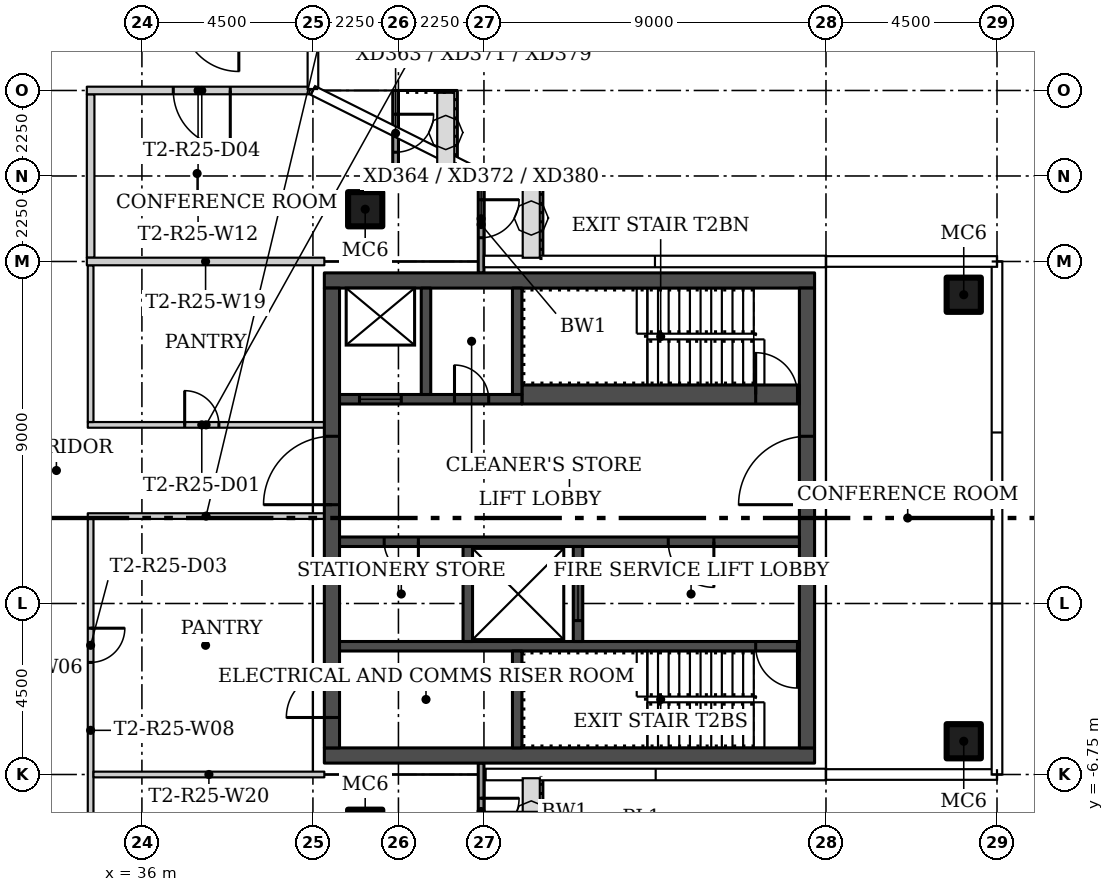
"""IFC4 building model, lengths in metres.
Left out: names, types, materials, properties, quantities, classifications, styles, units other than length and angle.
Written with IfcOpenShell. Run it as: python <this file> out.ifc"""

import sys

from ifc_helpers import new_model, si_unit, direction, frame, frame_2d, origin, origin_2d, place, context, subcontext, project, spatial, rectangle, hollow_rectangle, extrude, element, fill, save


model = new_model("IFC4")
c1 = context("Model", 3, precision=1e-05, world=origin(), true_north=direction((0.0, 1.0)))
c2 = subcontext(c1, "Body", "Model", "MODEL_VIEW")
j1 = project(units=[si_unit("LENGTHUNIT", "METRE"), si_unit("PLANEANGLEUNIT", "RADIAN")], contexts=[c1])
p1 = place(None, origin())
s1 = spatial("IfcSite", under=j1, at=p1, CompositionType="ELEMENT")
p2 = place(p1, origin())
s2 = spatial("IfcBuilding", under=s1, at=p2, CompositionType="ELEMENT")
p3 = place(p2, frame((0.0, 0.0, 230.4)))
s3 = spatial("IfcBuildingStorey", under=s2, at=p3, CompositionType="ELEMENT", Elevation=230.4)
for number, where in (
    (1, (41.875, 8.125, 0.0)),
    (2, (41.875, -8.125, 0.0)),
    (3, (57.625, -5.875, 0.0)),
    (4, (57.625, 5.875, 0.0)),
):
    element("IfcColumn", number, at=place(p3, frame(where)), inside=s3, PredefinedType="COLUMN", context=c2, shape_type="SweptSolid", body=[
        extrude(hollow_rectangle(XDim=0.9, YDim=0.9, WallThickness=0.036, at=origin_2d()), origin(), (0.0, 0.0, 1.0), 3.55),
    ])
p4 = place(p3, frame((40.8, 0.05, 0.0), z_axis=(0.0, 0.0, 1.0), x_axis=(-1.0, 0.0, 0.0)))
e5 = element("IfcWall", 5, at=p4, inside=s3, PredefinedType="PARTITIONING", context=c2, shape_type="SweptSolid", body=[
    extrude(rectangle(XDim=6.225, YDim=0.15, at=frame_2d((3.112, 0.0))), origin(), (0.0, 0.0, 1.0), 3.55),
])
p5 = place(p3, frame((34.575, 2.45, 0.0)))
e6 = element("IfcWall", 6, at=p5, inside=s3, PredefinedType="PARTITIONING", context=c2, shape_type="SweptSolid", body=[
    extrude(rectangle(XDim=6.225, YDim=0.15, at=frame_2d((3.112, 0.0))), origin(), (0.0, 0.0, 1.0), 3.55),
])
p6 = place(p5, frame((2.55, 0.0, 0.0)))
e7 = element("IfcOpeningElement", 7, at=p6, cuts=e6, PredefinedType="OPENING", context=c2, shape_type="SweptSolid", body=[
    extrude(rectangle(XDim=0.9, YDim=2.1, at=frame_2d((0.45, 1.05))), frame((0.0, 0.085, 0.0), z_axis=(0.0, -1.0, 0.0), x_axis=(1.0, 0.0, 0.0)), (0.0, 0.0, 1.0), 0.17),
])
p7 = place(p3, frame((34.65, -0.025, 0.0), z_axis=(0.0, 0.0, 1.0), x_axis=(0.0, -1.0, 0.0)))
e8 = element("IfcWall", 8, at=p7, inside=s3, PredefinedType="PARTITIONING", context=c2, shape_type="SweptSolid", body=[
    extrude(rectangle(XDim=11.125, YDim=0.15, at=frame_2d((5.562, 0.0))), origin(), (0.0, 0.0, 1.0), 3.55),
])
p8 = place(p7, frame((8.475, 0.0, 0.0)))
e9 = element("IfcOpeningElement", 9, at=p8, cuts=e8, PredefinedType="OPENING", context=c2, shape_type="SweptSolid", body=[
    extrude(rectangle(XDim=1.0, YDim=2.4, at=frame_2d((0.5, 1.2))), frame((0.0, 0.085, 0.0), z_axis=(0.0, -1.0, 0.0), x_axis=(1.0, 0.0, 0.0)), (0.0, 0.0, 1.0), 0.17),
])
p9 = place(p7, frame((2.875, 0.0, 0.0)))
e10 = element("IfcOpeningElement", 10, at=p9, cuts=e8, PredefinedType="OPENING", context=c2, shape_type="SweptSolid", body=[
    extrude(rectangle(XDim=0.9, YDim=2.1, at=frame_2d((0.45, 1.05))), frame((0.0, 0.085, 0.0), z_axis=(0.0, -1.0, 0.0), x_axis=(1.0, 0.0, 0.0)), (0.0, 0.0, 1.0), 0.17),
])
p10 = place(p3, frame((34.65, 6.65, 0.0), z_axis=(0.0, 0.0, 1.0), x_axis=(0.0, -1.0, 0.0)))
e11 = element("IfcWall", 11, at=p10, inside=s3, PredefinedType="PARTITIONING", context=c2, shape_type="SweptSolid", body=[
    extrude(rectangle(XDim=4.125, YDim=0.15, at=frame_2d((2.062, 0.0))), origin(), (0.0, 0.0, 1.0), 3.55),
])
p11 = place(p3, frame((34.65, 11.15, 0.0), z_axis=(0.0, 0.0, 1.0), x_axis=(0.0, -1.0, 0.0)))
e12 = element("IfcWall", 12, at=p11, inside=s3, PredefinedType="PARTITIONING", context=c2, shape_type="SweptSolid", body=[
    extrude(rectangle(XDim=4.3, YDim=0.2, at=frame_2d((2.15, 0.0))), origin(), (0.0, 0.0, 1.0), 3.55),
])
p12 = place(p3, frame((40.405, 11.25, 0.0), z_axis=(0.0, 0.0, 1.0), x_axis=(-1.0, 0.0, 0.0)))
e13 = element("IfcWall", 13, at=p12, inside=s3, PredefinedType="PARTITIONING", context=c2, shape_type="SweptSolid", body=[
    extrude(rectangle(XDim=5.855, YDim=0.2, at=frame_2d((2.927, 0.0))), origin(), (0.0, 0.0, 1.0), 3.55),
])
p13 = place(p12, frame((2.08, 0.0, 0.0)))
e14 = element("IfcOpeningElement", 14, at=p13, cuts=e13, PredefinedType="OPENING", context=c2, shape_type="SweptSolid", body=[
    extrude(rectangle(XDim=1.5, YDim=2.4, at=frame_2d((0.75, 1.2))), frame((0.0, 0.11, 0.0), z_axis=(0.0, -1.0, 0.0), x_axis=(1.0, 0.0, 0.0)), (0.0, 0.0, 1.0), 0.22),
])
p14 = place(p3, frame((40.8, 6.75, 0.0), z_axis=(0.0, 0.0, 1.0), x_axis=(-1.0, 0.0, 0.0)))
e15 = element("IfcWall", 15, at=p14, inside=s3, PredefinedType="PARTITIONING", context=c2, shape_type="SweptSolid", body=[
    extrude(rectangle(XDim=6.25, YDim=0.2, at=frame_2d((3.125, 0.0))), origin(), (0.0, 0.0, 1.0), 3.55),
])
p15 = place(p3, frame((34.725, -6.75, 0.0)))
e16 = element("IfcWall", 16, at=p15, inside=s3, PredefinedType="PARTITIONING", context=c2, shape_type="SweptSolid", body=[
    extrude(rectangle(XDim=6.075, YDim=0.15, at=frame_2d((3.037, 0.0))), origin(), (0.0, 0.0, 1.0), 3.55),
])
p16 = place(p3, frame((42.675, 11.25, 0.0), z_axis=(0.0, 0.0, 1.0), x_axis=(0.0, -1.0, 0.0)))
e17 = element("IfcWall", 17, at=p16, inside=s3, PredefinedType="SOLIDWALL", context=c2, shape_type="SweptSolid", body=[
    extrude(rectangle(XDim=2.25, YDim=0.15, at=frame_2d((1.125, 0.0))), origin(), (0.0, 0.0, 1.0), 3.45),
])
p17 = place(p16, frame((0.625, 0.0, 0.0)))
e18 = element("IfcOpeningElement", 18, at=p17, cuts=e17, PredefinedType="OPENING", context=c2, shape_type="SweptSolid", body=[
    extrude(rectangle(XDim=1.0, YDim=2.4, at=frame_2d((0.5, 1.2))), frame((0.0, 0.085, 0.0), z_axis=(0.0, -1.0, 0.0), x_axis=(1.0, 0.0, 0.0)), (0.0, 0.0, 1.0), 0.17),
])
p18 = place(p3, frame((44.925, 9.0, 0.0), z_axis=(0.0, 0.0, 1.0), x_axis=(0.0, -1.0, 0.0)))
e19 = element("IfcWall", 19, at=p18, inside=s3, PredefinedType="SOLIDWALL", context=c2, shape_type="SweptSolid", body=[
    extrude(rectangle(XDim=2.557, YDim=0.15, at=frame_2d((1.278, 0.0))), origin(), (0.0, 0.0, 1.0), 3.45),
])
p19 = place(p18, frame((0.625, 0.0, 0.0)))
e20 = element("IfcOpeningElement", 20, at=p19, cuts=e19, PredefinedType="OPENING", context=c2, shape_type="SweptSolid", body=[
    extrude(rectangle(XDim=1.0, YDim=2.4, at=frame_2d((0.5, 1.2))), frame((0.0, 0.085, 0.0), z_axis=(0.0, -1.0, 0.0), x_axis=(1.0, 0.0, 0.0)), (0.0, 0.0, 1.0), 0.17),
])
p20 = place(p3, frame((44.925, -6.448, 0.0), z_axis=(0.0, 0.0, 1.0), x_axis=(0.0, -1.0, 0.0)))
e21 = element("IfcWall", 21, at=p20, inside=s3, PredefinedType="SOLIDWALL", context=c2, shape_type="SweptSolid", body=[
    extrude(rectangle(XDim=2.552, YDim=0.15, at=frame_2d((1.276, 0.0))), origin(), (0.0, 0.0, 1.0), 3.45),
])
p21 = place(p20, frame((0.927, 0.0, 0.0)))
e22 = element("IfcOpeningElement", 22, at=p21, cuts=e21, PredefinedType="OPENING", context=c2, shape_type="SweptSolid", body=[
    extrude(rectangle(XDim=1.0, YDim=2.4, at=frame_2d((0.5, 1.2))), frame((0.0, 0.085, 0.0), z_axis=(0.0, -1.0, 0.0), x_axis=(1.0, 0.0, 0.0)), (0.0, 0.0, 1.0), 0.17),
])
for number, where, z_axis, x_axis in (
    (23, (53.7, -6.25, 0.0), (0.0, 0.0, 1.0), (-1.0, 0.0, 0.0)),
    (24, (53.7, 6.25, 0.0), (0.0, 0.0, 1.0), (-1.0, 0.0, 0.0)),
):
    element("IfcWall", number, at=place(p3, frame(where, z_axis=z_axis, x_axis=x_axis)), inside=s3, PredefinedType="SHEAR", context=c2, shape_type="SweptSolid", body=[
        extrude(rectangle(XDim=12.9, YDim=0.4, at=frame_2d((6.45, 0.0))), origin(), (0.0, 0.0, 1.0), 3.55),
    ])
p22 = place(p3, frame((53.5, -6.05, 0.0), z_axis=(0.0, 0.0, 1.0), x_axis=(0.0, 1.0, 0.0)))
e25 = element("IfcWall", 25, at=p22, inside=s3, PredefinedType="SHEAR", context=c2, shape_type="SweptSolid", body=[
    extrude(rectangle(XDim=12.1, YDim=0.4, at=frame_2d((6.05, 0.0))), origin(), (0.0, 0.0, 1.0), 3.55),
])
p23 = place(p22, frame((6.4, 0.0, 0.0)))
e26 = element("IfcOpeningElement", 26, at=p23, cuts=e25, PredefinedType="OPENING", context=c2, shape_type="SweptSolid", body=[
    extrude(rectangle(XDim=1.8, YDim=2.4, at=frame_2d((0.9, 1.2))), frame((0.0, 0.21, 0.0), z_axis=(0.0, -1.0, 0.0), x_axis=(1.0, 0.0, 0.0)), (0.0, 0.0, 1.0), 0.42),
])
p24 = place(p3, frame((41.0, -6.05, 0.0), z_axis=(0.0, 0.0, 1.0), x_axis=(0.0, 1.0, 0.0)))
e27 = element("IfcWall", 27, at=p24, inside=s3, PredefinedType="SHEAR", context=c2, shape_type="SweptSolid", body=[
    extrude(rectangle(XDim=12.1, YDim=0.4, at=frame_2d((6.05, 0.0))), origin(), (0.0, 0.0, 1.0), 3.55),
])
p25 = place(p24, frame((0.8, 0.0, 0.0)))
e28 = element("IfcOpeningElement", 28, at=p25, cuts=e27, PredefinedType="OPENING", context=c2, shape_type="SweptSolid", body=[
    extrude(rectangle(XDim=1.2, YDim=2.1, at=frame_2d((0.6, 1.05))), frame((0.0, 0.21, 0.0), z_axis=(0.0, -1.0, 0.0), x_axis=(1.0, 0.0, 0.0)), (0.0, 0.0, 1.0), 0.42),
])
p26 = place(p24, frame((6.4, 0.0, 0.0)))
e29 = element("IfcOpeningElement", 29, at=p26, cuts=e27, PredefinedType="OPENING", context=c2, shape_type="SweptSolid", body=[
    extrude(rectangle(XDim=1.8, YDim=2.4, at=frame_2d((0.9, 1.2))), frame((0.0, 0.21, 0.0), z_axis=(0.0, -1.0, 0.0), x_axis=(1.0, 0.0, 0.0)), (0.0, 0.0, 1.0), 0.42),
])
p27 = place(p3, frame((53.3, -3.375, 0.0), z_axis=(0.0, 0.0, 1.0), x_axis=(-1.0, 0.0, 0.0)))
e30 = element("IfcWall", 30, at=p27, inside=s3, PredefinedType="SHEAR", context=c2, shape_type="SweptSolid", body=[
    extrude(rectangle(XDim=12.1, YDim=0.25, at=frame_2d((6.05, 0.0))), origin(), (0.0, 0.0, 1.0), 3.55),
])
p28 = place(p27, frame((0.05, 0.0, 0.0)))
e31 = element("IfcOpeningElement", 31, at=p28, cuts=e30, PredefinedType="OPENING", context=c2, shape_type="SweptSolid", body=[
    extrude(rectangle(XDim=1.1, YDim=2.1, at=frame_2d((0.55, 1.05))), frame((0.0, 0.135, 0.0), z_axis=(0.0, -1.0, 0.0), x_axis=(1.0, 0.0, 0.0)), (0.0, 0.0, 1.0), 0.27),
])
p29 = place(p3, frame((45.875, -6.05, 0.0), z_axis=(0.0, 0.0, 1.0), x_axis=(0.0, 1.0, 0.0)))
e32 = element("IfcWall", 32, at=p29, inside=s3, PredefinedType="SHEAR", context=c2, shape_type="SweptSolid", body=[
    extrude(rectangle(XDim=2.55, YDim=0.25, at=frame_2d((1.275, 0.0))), origin(), (0.0, 0.0, 1.0), 3.55),
])
p30 = place(p3, frame((53.3, -0.625, 0.0), z_axis=(0.0, 0.0, 1.0), x_axis=(-1.0, 0.0, 0.0)))
e33 = element("IfcWall", 33, at=p30, inside=s3, PredefinedType="SHEAR", context=c2, shape_type="SweptSolid", body=[
    extrude(rectangle(XDim=12.1, YDim=0.25, at=frame_2d((6.05, 0.0))), origin(), (0.0, 0.0, 1.0), 3.55),
])
p31 = place(p30, frame((2.25, 0.0, 0.0)))
e34 = element("IfcOpeningElement", 34, at=p31, cuts=e33, PredefinedType="OPENING", context=c2, shape_type="SweptSolid", body=[
    extrude(rectangle(XDim=1.2, YDim=2.1, at=frame_2d((0.6, 1.05))), frame((0.0, 0.135, 0.0), z_axis=(0.0, -1.0, 0.0), x_axis=(1.0, 0.0, 0.0)), (0.0, 0.0, 1.0), 0.27),
])
p32 = place(p30, frame((10.025, 0.0, 0.0)))
e35 = element("IfcOpeningElement", 35, at=p32, cuts=e33, PredefinedType="OPENING", context=c2, shape_type="SweptSolid", body=[
    extrude(rectangle(XDim=0.9, YDim=2.1, at=frame_2d((0.45, 1.05))), frame((0.0, 0.135, 0.0), z_axis=(0.0, -1.0, 0.0), x_axis=(1.0, 0.0, 0.0)), (0.0, 0.0, 1.0), 0.27),
])
p33 = place(p3, frame((47.475, -3.25, 0.0), z_axis=(0.0, 0.0, 1.0), x_axis=(0.0, 1.0, 0.0)))
e36 = element("IfcWall", 36, at=p33, inside=s3, PredefinedType="SHEAR", context=c2, shape_type="SweptSolid", body=[
    extrude(rectangle(XDim=2.5, YDim=0.25, at=frame_2d((1.25, 0.0))), origin(), (0.0, 0.0, 1.0), 3.55),
])
p34 = place(p33, frame((0.55, 0.0, 0.0)))
e37 = element("IfcOpeningElement", 37, at=p34, cuts=e36, PredefinedType="OPENING", context=c2, shape_type="SweptSolid", body=[
    extrude(rectangle(XDim=1.4, YDim=2.4, at=frame_2d((0.7, 1.2))), frame((0.0, 0.135, 0.0), z_axis=(0.0, -1.0, 0.0), x_axis=(1.0, 0.0, 0.0)), (0.0, 0.0, 1.0), 0.27),
])
p35 = place(p3, frame((44.575, -3.25, 0.0), z_axis=(0.0, 0.0, 1.0), x_axis=(0.0, 1.0, 0.0)))
e38 = element("IfcWall", 38, at=p35, inside=s3, PredefinedType="SHEAR", context=c2, shape_type="SweptSolid", body=[
    extrude(rectangle(XDim=2.5, YDim=0.25, at=frame_2d((1.25, 0.0))), origin(), (0.0, 0.0, 1.0), 3.55),
])
p36 = place(p3, frame((46.0, 3.25, 0.0)))
e39 = element("IfcWall", 39, at=p36, inside=s3, PredefinedType="SHEAR", context=c2, shape_type="SweptSolid", body=[
    extrude(rectangle(XDim=7.3, YDim=0.5, at=frame_2d((3.65, 0.0))), origin(), (0.0, 0.0, 1.0), 3.55),
])
p37 = place(p36, frame((6.15, 0.0, 0.0)))
e40 = element("IfcOpeningElement", 40, at=p37, cuts=e39, PredefinedType="OPENING", context=c2, shape_type="SweptSolid", body=[
    extrude(rectangle(XDim=1.1, YDim=2.1, at=frame_2d((0.55, 1.05))), frame((0.0, 0.26, 0.0), z_axis=(0.0, -1.0, 0.0), x_axis=(1.0, 0.0, 0.0)), (0.0, 0.0, 1.0), 0.52),
])
p38 = place(p3, frame((41.2, 3.125, 0.0)))
e41 = element("IfcWall", 41, at=p38, inside=s3, PredefinedType="SHEAR", context=c2, shape_type="SweptSolid", body=[
    extrude(rectangle(XDim=4.8, YDim=0.25, at=frame_2d((2.4, 0.0))), origin(), (0.0, 0.0, 1.0), 3.55),
])
p39 = place(p38, frame((0.525, 0.0, 0.0)))
e42 = element("IfcOpeningElement", 42, at=p39, cuts=e41, PredefinedType="OPENING", context=c2, shape_type="SweptSolid", body=[
    extrude(rectangle(XDim=1.1, YDim=2.1, at=frame_2d((0.55, 1.05))), frame((0.0, 0.135, 0.0), z_axis=(0.0, -1.0, 0.0), x_axis=(1.0, 0.0, 0.0)), (0.0, 0.0, 1.0), 0.27),
])
p40 = place(p38, frame((3.025, 0.0, 0.0)))
e43 = element("IfcOpeningElement", 43, at=p40, cuts=e41, PredefinedType="OPENING", context=c2, shape_type="SweptSolid", body=[
    extrude(rectangle(XDim=0.9, YDim=2.1, at=frame_2d((0.45, 1.05))), frame((0.0, 0.135, 0.0), z_axis=(0.0, -1.0, 0.0), x_axis=(1.0, 0.0, 0.0)), (0.0, 0.0, 1.0), 0.27),
])
for number, where, z_axis, x_axis in (
    (44, (45.875, 3.25, 0.0), (0.0, 0.0, 1.0), (0.0, 1.0, 0.0)),
    (45, (43.475, 3.25, 0.0), (0.0, 0.0, 1.0), (0.0, 1.0, 0.0)),
):
    element("IfcWall", number, at=place(p3, frame(where, z_axis=z_axis, x_axis=x_axis)), inside=s3, PredefinedType="SHEAR", context=c2, shape_type="SweptSolid", body=[
        extrude(rectangle(XDim=2.8, YDim=0.25, at=frame_2d((1.4, 0.0))), origin(), (0.0, 0.0, 1.0), 3.55),
    ])
p41 = place(p6, origin())
e46 = element("IfcDoor", 46, at=p41, inside=s3, OperationType="SINGLE_SWING_RIGHT", PredefinedType="DOOR", context=c2, shape_type="SweptSolid", body=[
    extrude(rectangle(XDim=0.9, YDim=2.1, at=frame_2d((0.45, 1.05))), frame((0.0, 0.025, 0.0), z_axis=(0.0, -1.0, 0.0), x_axis=(1.0, 0.0, 0.0)), (0.0, 0.0, 1.0), 0.05),
])
fill(e7, e46)
p42 = place(p9, origin())
e47 = element("IfcDoor", 47, at=p42, inside=s3, OperationType="SINGLE_SWING_RIGHT", PredefinedType="DOOR", context=c2, shape_type="SweptSolid", body=[
    extrude(rectangle(XDim=0.9, YDim=2.1, at=frame_2d((0.45, 1.05))), frame((0.0, 0.025, 0.0), z_axis=(0.0, -1.0, 0.0), x_axis=(1.0, 0.0, 0.0)), (0.0, 0.0, 1.0), 0.05),
])
fill(e10, e47)
p43 = place(p13, origin())
e48 = element("IfcDoor", 48, at=p43, inside=s3, OperationType="DOUBLE_DOOR_SINGLE_SWING", PredefinedType="DOOR", context=c2, shape_type="SweptSolid", body=[
    extrude(rectangle(XDim=1.5, YDim=2.4, at=frame_2d((0.75, 1.2))), frame((0.0, 0.025, 0.0), z_axis=(0.0, -1.0, 0.0), x_axis=(1.0, 0.0, 0.0)), (0.0, 0.0, 1.0), 0.05),
])
fill(e14, e48)
p44 = place(p17, origin())
e49 = element("IfcDoor", 49, at=p44, inside=s3, OperationType="SINGLE_SWING_RIGHT", PredefinedType="DOOR", context=c2, shape_type="SweptSolid", body=[
    extrude(rectangle(XDim=1.0, YDim=2.4, at=frame_2d((0.5, 1.2))), frame((0.0, 0.025, 0.0), z_axis=(0.0, -1.0, 0.0), x_axis=(1.0, 0.0, 0.0)), (0.0, 0.0, 1.0), 0.05),
])
fill(e18, e49)
p45 = place(p19, origin())
e50 = element("IfcDoor", 50, at=p45, inside=s3, OperationType="SINGLE_SWING_LEFT", PredefinedType="DOOR", context=c2, shape_type="SweptSolid", body=[
    extrude(rectangle(XDim=1.0, YDim=2.4, at=frame_2d((0.5, 1.2))), frame((0.0, 0.025, 0.0), z_axis=(0.0, -1.0, 0.0), x_axis=(1.0, 0.0, 0.0)), (0.0, 0.0, 1.0), 0.05),
])
fill(e20, e50)
p46 = place(p21, origin())
e51 = element("IfcDoor", 51, at=p46, inside=s3, OperationType="SINGLE_SWING_RIGHT", PredefinedType="DOOR", context=c2, shape_type="SweptSolid", body=[
    extrude(rectangle(XDim=1.0, YDim=2.4, at=frame_2d((0.5, 1.2))), frame((0.0, 0.025, 0.0), z_axis=(0.0, -1.0, 0.0), x_axis=(1.0, 0.0, 0.0)), (0.0, 0.0, 1.0), 0.05),
])
fill(e22, e51)
p47 = place(p23, origin())
e52 = element("IfcDoor", 52, at=p47, inside=s3, OperationType="DOUBLE_DOOR_SINGLE_SWING", PredefinedType="DOOR", context=c2, shape_type="SweptSolid", body=[
    extrude(rectangle(XDim=1.8, YDim=2.4, at=frame_2d((0.9, 1.2))), frame((0.0, 0.025, 0.0), z_axis=(0.0, -1.0, 0.0), x_axis=(1.0, 0.0, 0.0)), (0.0, 0.0, 1.0), 0.05),
])
fill(e26, e52)
p48 = place(p25, origin())
e53 = element("IfcDoor", 53, at=p48, inside=s3, OperationType="SINGLE_SWING_LEFT", PredefinedType="DOOR", context=c2, shape_type="SweptSolid", body=[
    extrude(rectangle(XDim=1.2, YDim=2.1, at=frame_2d((0.6, 1.05))), frame((0.0, 0.025, 0.0), z_axis=(0.0, -1.0, 0.0), x_axis=(1.0, 0.0, 0.0)), (0.0, 0.0, 1.0), 0.05),
])
fill(e28, e53)
p49 = place(p26, origin())
e54 = element("IfcDoor", 54, at=p49, inside=s3, OperationType="DOUBLE_DOOR_SINGLE_SWING", PredefinedType="DOOR", context=c2, shape_type="SweptSolid", body=[
    extrude(rectangle(XDim=1.8, YDim=2.4, at=frame_2d((0.9, 1.2))), frame((0.0, 0.025, 0.0), z_axis=(0.0, -1.0, 0.0), x_axis=(1.0, 0.0, 0.0)), (0.0, 0.0, 1.0), 0.05),
])
fill(e29, e54)
p50 = place(p28, origin())
e55 = element("IfcDoor", 55, at=p50, inside=s3, OperationType="SINGLE_SWING_LEFT", PredefinedType="DOOR", context=c2, shape_type="SweptSolid", body=[
    extrude(rectangle(XDim=1.1, YDim=2.1, at=frame_2d((0.55, 1.05))), frame((0.0, 0.025, 0.0), z_axis=(0.0, -1.0, 0.0), x_axis=(1.0, 0.0, 0.0)), (0.0, 0.0, 1.0), 0.05),
])
fill(e31, e55)
p51 = place(p31, origin())
e56 = element("IfcDoor", 56, at=p51, inside=s3, OperationType="SINGLE_SWING_LEFT", PredefinedType="DOOR", context=c2, shape_type="SweptSolid", body=[
    extrude(rectangle(XDim=1.2, YDim=2.1, at=frame_2d((0.6, 1.05))), frame((0.0, 0.025, 0.0), z_axis=(0.0, -1.0, 0.0), x_axis=(1.0, 0.0, 0.0)), (0.0, 0.0, 1.0), 0.05),
])
fill(e34, e56)
p52 = place(p32, origin())
e57 = element("IfcDoor", 57, at=p52, inside=s3, OperationType="SINGLE_SWING_RIGHT", PredefinedType="DOOR", context=c2, shape_type="SweptSolid", body=[
    extrude(rectangle(XDim=0.9, YDim=2.1, at=frame_2d((0.45, 1.05))), frame((0.0, 0.025, 0.0), z_axis=(0.0, -1.0, 0.0), x_axis=(1.0, 0.0, 0.0)), (0.0, 0.0, 1.0), 0.05),
])
fill(e35, e57)
p53 = place(p34, origin())
e58 = element("IfcDoor", 58, at=p53, inside=s3, OperationType="SLIDING_TO_LEFT", PredefinedType="DOOR", context=c2, shape_type="SweptSolid", body=[
    extrude(rectangle(XDim=1.4, YDim=2.4, at=frame_2d((0.7, 1.2))), frame((0.0, 0.025, 0.0), z_axis=(0.0, -1.0, 0.0), x_axis=(1.0, 0.0, 0.0)), (0.0, 0.0, 1.0), 0.05),
])
fill(e37, e58)
p54 = place(p37, origin())
e59 = element("IfcDoor", 59, at=p54, inside=s3, OperationType="SINGLE_SWING_RIGHT", PredefinedType="DOOR", context=c2, shape_type="SweptSolid", body=[
    extrude(rectangle(XDim=1.1, YDim=2.1, at=frame_2d((0.55, 1.05))), frame((0.0, 0.025, 0.0), z_axis=(0.0, -1.0, 0.0), x_axis=(1.0, 0.0, 0.0)), (0.0, 0.0, 1.0), 0.05),
])
fill(e40, e59)
p55 = place(p39, origin())
e60 = element("IfcDoor", 60, at=p55, inside=s3, OperationType="SLIDING_TO_LEFT", PredefinedType="DOOR", context=c2, shape_type="SweptSolid", body=[
    extrude(rectangle(XDim=1.1, YDim=2.1, at=frame_2d((0.55, 1.05))), frame((0.0, 0.025, 0.0), z_axis=(0.0, -1.0, 0.0), x_axis=(1.0, 0.0, 0.0)), (0.0, 0.0, 1.0), 0.05),
])
fill(e42, e60)
p56 = place(p40, origin())
e61 = element("IfcDoor", 61, at=p56, inside=s3, OperationType="SINGLE_SWING_RIGHT", PredefinedType="DOOR", context=c2, shape_type="SweptSolid", body=[
    extrude(rectangle(XDim=0.9, YDim=2.1, at=frame_2d((0.45, 1.05))), frame((0.0, 0.025, 0.0), z_axis=(0.0, -1.0, 0.0), x_axis=(1.0, 0.0, 0.0)), (0.0, 0.0, 1.0), 0.05),
])
fill(e43, e61)
save(model, sys.argv[1])
